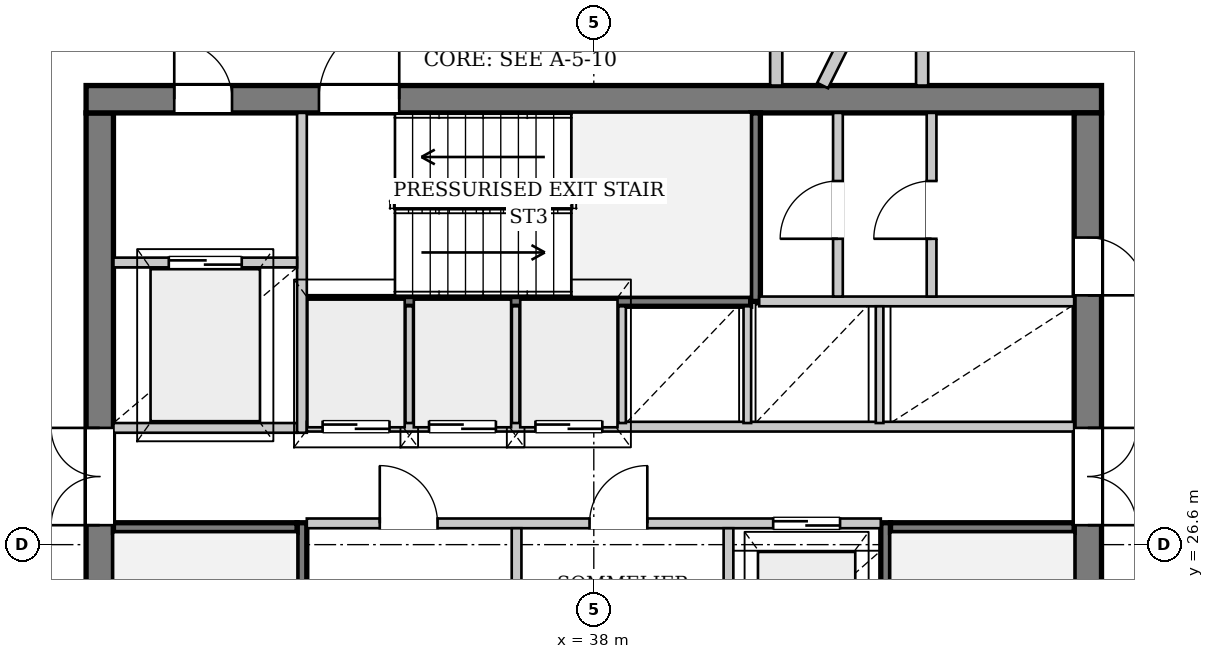
"""IFC4 building model, lengths in metres.
Left out: names, types, materials, properties, quantities, classifications, styles, units other than length and angle.
Written with IfcOpenShell. Run it as: python <this file> out.ifc"""

import sys

from ifc_helpers import new_model, si_unit, direction, frame, frame_2d, origin, place, context, subcontext, project, spatial, rectangle, extrude, source, transform, mapped, element, fill, save


model = new_model("IFC4")
c1 = context("Model", 3, precision=1e-05, world=origin(), true_north=direction((0.0, 1.0)))
c2 = subcontext(c1, "Body", "Model", "MODEL_VIEW")
j1 = project(units=[si_unit("LENGTHUNIT", "METRE"), si_unit("PLANEANGLEUNIT", "RADIAN")], contexts=[c1])
p1 = place(None, origin())
s1 = spatial("IfcSite", under=j1, at=p1, CompositionType="ELEMENT")
p2 = place(p1, origin())
s2 = spatial("IfcBuilding", under=s1, at=p2, CompositionType="ELEMENT")
p3 = place(p2, frame((0.0, 0.0, 238.1)))
s3 = spatial("IfcBuildingStorey", under=s2, at=p3, CompositionType="ELEMENT", Elevation=238.1)
p4 = place(p3, frame((15.525, 29.57, 0.0), z_axis=(0.0, 0.0, 1.0), x_axis=(0.855554684799, 0.517712450418, 0.0)))
e1 = element("IfcWall", 1, at=p4, inside=s3, PredefinedType="SOLIDWALL", context=c2, shape_type="SweptSolid", body=[
    extrude(rectangle(XDim=22.253, YDim=0.38, at=frame_2d((11.126, 0.0))), origin(), (0.0, 0.0, 1.0), 2.872),
])
p5 = place(p4, frame((5.131, 0.0, 0.502)))
e2 = element("IfcOpeningElement", 2, at=p5, cuts=e1, PredefinedType="OPENING", context=c2, shape_type="SweptSolid", body=[
    extrude(rectangle(XDim=2.2, YDim=2.25, at=frame_2d((1.1, 1.125))), frame((0.0, 0.2, 0.0), z_axis=(0.0, -1.0, 0.0), x_axis=(1.0, 0.0, 0.0)), (0.0, 0.0, 1.0), 0.4),
])
p6 = place(p4, frame((14.922, 0.0, 0.502)))
e3 = element("IfcOpeningElement", 3, at=p6, cuts=e1, PredefinedType="OPENING", context=c2, shape_type="SweptSolid", body=[
    extrude(rectangle(XDim=2.2, YDim=2.25, at=frame_2d((1.1, 1.125))), frame((0.0, 0.2, 0.0), z_axis=(0.0, -1.0, 0.0), x_axis=(1.0, 0.0, 0.0)), (0.0, 0.0, 1.0), 0.4),
])
p7 = place(p3, frame((29.875, 19.5, 0.0), z_axis=(0.0, 0.0, 1.0), x_axis=(0.0, 1.0, 0.0)))
e4 = element("IfcWall", 4, at=p7, inside=s3, PredefinedType="SHEAR", context=c2, shape_type="SweptSolid", body=[
    extrude(rectangle(XDim=14.2, YDim=0.45, at=frame_2d((7.1, 0.0))), origin(), (0.0, 0.0, 1.0), 3.38),
])
p8 = place(p7, frame((7.42, 0.0, 0.0)))
e5 = element("IfcOpeningElement", 5, at=p8, cuts=e4, PredefinedType="OPENING", context=c2, shape_type="SweptSolid", body=[
    extrude(rectangle(XDim=1.6, YDim=2.2, at=frame_2d((0.8, 1.1))), frame((0.0, 0.235, 0.0), z_axis=(0.0, -1.0, 0.0), x_axis=(1.0, 0.0, 0.0)), (0.0, 0.0, 1.0), 0.47),
])
p9 = place(p3, frame((29.65, 33.925, 0.0), z_axis=(0.0, 0.0, 1.0), x_axis=(1.0, 0.0, 0.0)))
e6 = element("IfcWall", 6, at=p9, inside=s3, PredefinedType="SHEAR", context=c2, shape_type="SweptSolid", body=[
    extrude(rectangle(XDim=16.7, YDim=0.45, at=frame_2d((8.35, 0.0))), origin(), (0.0, 0.0, 1.0), 3.38),
])
p10 = place(p9, frame((1.45, 0.0, 0.0)))
e7 = element("IfcOpeningElement", 7, at=p10, cuts=e6, PredefinedType="OPENING", context=c2, shape_type="SweptSolid", body=[
    extrude(rectangle(XDim=0.95, YDim=2.1, at=frame_2d((0.475, 1.05))), frame((0.0, 0.235, 0.0), z_axis=(0.0, -1.0, 0.0), x_axis=(1.0, 0.0, 0.0)), (0.0, 0.0, 1.0), 0.47),
])
p11 = place(p9, frame((3.83, 0.0, 0.0)))
e8 = element("IfcOpeningElement", 8, at=p11, cuts=e6, PredefinedType="OPENING", context=c2, shape_type="SweptSolid", body=[
    extrude(rectangle(XDim=1.32, YDim=2.2, at=frame_2d((0.66, 1.1))), frame((0.0, 0.235, 0.0), z_axis=(0.0, -1.0, 0.0), x_axis=(1.0, 0.0, 0.0)), (0.0, 0.0, 1.0), 0.47),
])
p12 = place(p3, frame((46.125, 33.7, 0.0), z_axis=(0.0, 0.0, 1.0), x_axis=(0.0, -1.0, 0.0)))
e9 = element("IfcWall", 9, at=p12, inside=s3, PredefinedType="SHEAR", context=c2, shape_type="SweptSolid", body=[
    extrude(rectangle(XDim=14.2, YDim=0.45, at=frame_2d((7.1, 0.0))), origin(), (0.0, 0.0, 1.0), 3.38),
])
p13 = place(p12, frame((5.18, 0.0, 0.0)))
e10 = element("IfcOpeningElement", 10, at=p13, cuts=e9, PredefinedType="OPENING", context=c2, shape_type="SweptSolid", body=[
    extrude(rectangle(XDim=1.6, YDim=2.2, at=frame_2d((0.8, 1.1))), frame((0.0, 0.235, 0.0), z_axis=(0.0, -1.0, 0.0), x_axis=(1.0, 0.0, 0.0)), (0.0, 0.0, 1.0), 0.47),
])
p14 = place(p12, frame((2.05, 0.0, 0.0)))
e11 = element("IfcOpeningElement", 11, at=p14, cuts=e9, PredefinedType="OPENING", context=c2, shape_type="SweptSolid", body=[
    extrude(rectangle(XDim=0.95, YDim=2.1, at=frame_2d((0.475, 1.05))), frame((0.0, 0.235, 0.0), z_axis=(0.0, -1.0, 0.0), x_axis=(1.0, 0.0, 0.0)), (0.0, 0.0, 1.0), 0.47),
])
p15 = place(p3, frame((33.2, 19.5, 0.0), z_axis=(0.0, 0.0, 1.0), x_axis=(0.0, 1.0, 0.0)))
e12 = element("IfcWall", 12, at=p15, inside=s3, PredefinedType="PARTITIONING", context=c2, shape_type="SweptSolid", body=[
    extrude(rectangle(XDim=7.46, YDim=0.16, at=frame_2d((3.73, 0.0))), origin(), (0.0, 0.0, 1.0), 3.38),
])
p16 = place(p15, frame((0.08, 0.0, 0.0)))
e13 = element("IfcOpeningElement", 13, at=p16, cuts=e12, PredefinedType="OPENING", context=c2, shape_type="SweptSolid", body=[
    extrude(rectangle(XDim=1.32, YDim=2.2, at=frame_2d((0.66, 1.1))), frame((0.0, 0.09, 0.0), z_axis=(0.0, -1.0, 0.0), x_axis=(1.0, 0.0, 0.0)), (0.0, 0.0, 1.0), 0.18),
])
p17 = place(p3, frame((30.1, 26.88, 0.0), z_axis=(0.0, 0.0, 1.0), x_axis=(1.0, 0.0, 0.0)))
e14 = element("IfcWall", 14, at=p17, inside=s3, PredefinedType="PARTITIONING", context=c2, shape_type="SweptSolid", body=[
    extrude(rectangle(XDim=3.02, YDim=0.16, at=frame_2d((1.51, 0.0))), origin(), (0.0, 0.0, 1.0), 3.38),
])
p18 = place(p3, frame((42.8, 26.96, 0.0), z_axis=(0.0, 0.0, 1.0), x_axis=(0.0, -1.0, 0.0)))
e15 = element("IfcWall", 15, at=p18, inside=s3, PredefinedType="PARTITIONING", context=c2, shape_type="SweptSolid", body=[
    extrude(rectangle(XDim=7.46, YDim=0.16, at=frame_2d((3.73, 0.0))), origin(), (0.0, 0.0, 1.0), 3.38),
])
p19 = place(p18, frame((6.06, 0.0, 0.0)))
e16 = element("IfcOpeningElement", 16, at=p19, cuts=e15, PredefinedType="OPENING", context=c2, shape_type="SweptSolid", body=[
    extrude(rectangle(XDim=1.32, YDim=2.2, at=frame_2d((0.66, 1.1))), frame((0.0, 0.09, 0.0), z_axis=(0.0, -1.0, 0.0), x_axis=(1.0, 0.0, 0.0)), (0.0, 0.0, 1.0), 0.18),
])
p20 = place(p3, frame((42.88, 26.88, 0.0), z_axis=(0.0, 0.0, 1.0), x_axis=(1.0, 0.0, 0.0)))
e17 = element("IfcWall", 17, at=p20, inside=s3, PredefinedType="PARTITIONING", context=c2, shape_type="SweptSolid", body=[
    extrude(rectangle(XDim=3.02, YDim=0.16, at=frame_2d((1.51, 0.0))), origin(), (0.0, 0.0, 1.0), 3.38),
])
p21 = place(p3, frame((33.28, 30.6, 0.0), z_axis=(0.0, 0.0, 1.0), x_axis=(1.0, 0.0, 0.0)))
e18 = element("IfcWall", 18, at=p21, inside=s3, PredefinedType="PARTITIONING", context=c2, shape_type="SweptSolid", body=[
    extrude(rectangle(XDim=7.3, YDim=0.16, at=frame_2d((3.65, 0.0))), origin(), (0.0, 0.0, 1.0), 3.38),
])
p22 = place(p3, frame((40.66, 30.6, 0.0), z_axis=(0.0, 0.0, 1.0), x_axis=(0.0, 1.0, 0.0)))
e19 = element("IfcWall", 19, at=p22, inside=s3, PredefinedType="PARTITIONING", context=c2, shape_type="SweptSolid", body=[
    extrude(rectangle(XDim=3.1, YDim=0.16, at=frame_2d((1.55, 0.0))), origin(), (0.0, 0.0, 1.0), 3.38),
])
p23 = place(p3, frame((30.1, 28.52, 0.0), z_axis=(0.0, 0.0, 1.0), x_axis=(1.0, 0.0, 0.0)))
e20 = element("IfcWall", 20, at=p23, inside=s3, PredefinedType="PARTITIONING", context=c2, shape_type="SweptSolid", body=[
    extrude(rectangle(XDim=3.02, YDim=0.16, at=frame_2d((1.51, 0.0))), origin(), (0.0, 0.0, 1.0), 3.38),
])
p24 = place(p3, frame((33.2, 28.44, 0.0), z_axis=(0.0, 0.0, 1.0), x_axis=(0.0, 1.0, 0.0)))
e21 = element("IfcWall", 21, at=p24, inside=s3, PredefinedType="PARTITIONING", context=c2, shape_type="SweptSolid", body=[
    extrude(rectangle(XDim=5.26, YDim=0.16, at=frame_2d((2.63, 0.0))), origin(), (0.0, 0.0, 1.0), 3.38),
])
p25 = place(p3, frame((30.1, 31.24, 0.0), z_axis=(0.0, 0.0, 1.0), x_axis=(1.0, 0.0, 0.0)))
e22 = element("IfcWall", 22, at=p25, inside=s3, PredefinedType="PARTITIONING", context=c2, shape_type="SweptSolid", body=[
    extrude(rectangle(XDim=3.02, YDim=0.16, at=frame_2d((1.51, 0.0))), origin(), (0.0, 0.0, 1.0), 3.38),
])
p26 = place(p25, frame((0.91, 0.0, 0.0)))
e23 = element("IfcOpeningElement", 23, at=p26, cuts=e22, PredefinedType="OPENING", context=c2, shape_type="SweptSolid", body=[
    extrude(rectangle(XDim=1.2, YDim=2.2, at=frame_2d((0.6, 1.1))), frame((0.0, 0.09, 0.0), z_axis=(0.0, -1.0, 0.0), x_axis=(1.0, 0.0, 0.0)), (0.0, 0.0, 1.0), 0.18),
])
p27 = place(p3, frame((33.28, 26.95, 0.0), z_axis=(0.0, 0.0, 1.0), x_axis=(1.0, 0.0, 0.0)))
e24 = element("IfcWall", 24, at=p27, inside=s3, PredefinedType="PARTITIONING", context=c2, shape_type="SweptSolid", body=[
    extrude(rectangle(XDim=9.44, YDim=0.16, at=frame_2d((4.72, 0.0))), origin(), (0.0, 0.0, 1.0), 3.38),
])
p28 = place(p27, frame((1.2, 0.0, 0.0)))
e25 = element("IfcOpeningElement", 25, at=p28, cuts=e24, PredefinedType="OPENING", context=c2, shape_type="SweptSolid", body=[
    extrude(rectangle(XDim=0.95, YDim=2.1, at=frame_2d((0.475, 1.05))), frame((0.0, 0.09, 0.0), z_axis=(0.0, -1.0, 0.0), x_axis=(1.0, 0.0, 0.0)), (0.0, 0.0, 1.0), 0.18),
])
p29 = place(p27, frame((4.65, 0.0, 0.0)))
e26 = element("IfcOpeningElement", 26, at=p29, cuts=e24, PredefinedType="OPENING", context=c2, shape_type="SweptSolid", body=[
    extrude(rectangle(XDim=0.95, YDim=2.1, at=frame_2d((0.475, 1.05))), frame((0.0, 0.09, 0.0), z_axis=(0.0, -1.0, 0.0), x_axis=(1.0, 0.0, 0.0)), (0.0, 0.0, 1.0), 0.18),
])
p30 = place(p27, frame((7.67, 0.0, 0.0)))
e27 = element("IfcOpeningElement", 27, at=p30, cuts=e24, PredefinedType="OPENING", context=c2, shape_type="SweptSolid", body=[
    extrude(rectangle(XDim=1.1, YDim=2.2, at=frame_2d((0.55, 1.1))), frame((0.0, 0.09, 0.0), z_axis=(0.0, -1.0, 0.0), x_axis=(1.0, 0.0, 0.0)), (0.0, 0.0, 1.0), 0.18),
])
for number, where, z_axis, x_axis in (
    (28, (36.73, 24.56, 0.0), (0.0, 0.0, 1.0), (0.0, 1.0, 0.0)),
    (29, (40.215, 24.56, 0.0), (0.0, 0.0, 1.0), (0.0, 1.0, 0.0)),
):
    element("IfcWall", number, at=place(p3, frame(where, z_axis=z_axis, x_axis=x_axis)), inside=s3, PredefinedType="PARTITIONING", context=c2, shape_type="SweptSolid", body=[
        extrude(rectangle(XDim=2.31, YDim=0.16, at=frame_2d((1.155, 0.0))), origin(), (0.0, 0.0, 1.0), 3.38),
    ])
p31 = place(p3, frame((33.28, 28.54, 0.0), z_axis=(0.0, 0.0, 1.0), x_axis=(1.0, 0.0, 0.0)))
e30 = element("IfcWall", 30, at=p31, inside=s3, PredefinedType="PARTITIONING", context=c2, shape_type="SweptSolid", body=[
    extrude(rectangle(XDim=12.62, YDim=0.16, at=frame_2d((6.31, 0.0))), origin(), (0.0, 0.0, 1.0), 3.38),
])
p32 = place(p31, frame((0.26, 0.0, 0.0)))
e31 = element("IfcOpeningElement", 31, at=p32, cuts=e30, PredefinedType="OPENING", context=c2, shape_type="SweptSolid", body=[
    extrude(rectangle(XDim=1.1, YDim=2.2, at=frame_2d((0.55, 1.1))), frame((0.0, 0.09, 0.0), z_axis=(0.0, -1.0, 0.0), x_axis=(1.0, 0.0, 0.0)), (0.0, 0.0, 1.0), 0.18),
])
p33 = place(p31, frame((2.01, 0.0, 0.0)))
e32 = element("IfcOpeningElement", 32, at=p33, cuts=e30, PredefinedType="OPENING", context=c2, shape_type="SweptSolid", body=[
    extrude(rectangle(XDim=1.1, YDim=2.2, at=frame_2d((0.55, 1.1))), frame((0.0, 0.09, 0.0), z_axis=(0.0, -1.0, 0.0), x_axis=(1.0, 0.0, 0.0)), (0.0, 0.0, 1.0), 0.18),
])
p34 = place(p31, frame((3.76, 0.0, 0.0)))
e33 = element("IfcOpeningElement", 33, at=p34, cuts=e30, PredefinedType="OPENING", context=c2, shape_type="SweptSolid", body=[
    extrude(rectangle(XDim=1.1, YDim=2.2, at=frame_2d((0.55, 1.1))), frame((0.0, 0.09, 0.0), z_axis=(0.0, -1.0, 0.0), x_axis=(1.0, 0.0, 0.0)), (0.0, 0.0, 1.0), 0.18),
])
p35 = place(p3, frame((40.72, 30.6, 0.0), z_axis=(0.0, 0.0, 1.0), x_axis=(1.0, 0.0, 0.0)))
e34 = element("IfcWall", 34, at=p35, inside=s3, PredefinedType="PARTITIONING", context=c2, shape_type="SweptSolid", body=[
    extrude(rectangle(XDim=5.18, YDim=0.16, at=frame_2d((2.59, 0.0))), origin(), (0.0, 0.0, 1.0), 3.38),
])
for number, where, z_axis, x_axis in (
    (35, (34.965, 28.6, 0.0), (0.0, 0.0, 1.0), (0.0, 1.0, 0.0)),
    (36, (36.715, 28.6, 0.0), (0.0, 0.0, 1.0), (0.0, 1.0, 0.0)),
    (37, (38.465, 28.6, 0.0), (0.0, 0.0, 1.0), (0.0, 1.0, 0.0)),
    (38, (40.525, 28.6, 0.0), (0.0, 0.0, 1.0), (0.0, 1.0, 0.0)),
    (39, (42.7, 28.6, 0.0), (0.0, 0.0, 1.0), (0.0, 1.0, 0.0)),
):
    element("IfcWall", number, at=place(p3, frame(where, z_axis=z_axis, x_axis=x_axis)), inside=s3, PredefinedType="PARTITIONING", context=c2, shape_type="SweptSolid", body=[
        extrude(rectangle(XDim=1.92, YDim=0.125, at=frame_2d((0.96, 0.0))), origin(), (0.0, 0.0, 1.0), 3.38),
    ])
p36 = place(p3, frame((42.015, 30.68, 0.0), z_axis=(0.0, 0.0, 1.0), x_axis=(0.0, 1.0, 0.0)))
e40 = element("IfcWall", 40, at=p36, inside=s3, PredefinedType="PARTITIONING", context=c2, shape_type="SweptSolid", body=[
    extrude(rectangle(XDim=3.02, YDim=0.16, at=frame_2d((1.51, 0.0))), origin(), (0.0, 0.0, 1.0), 3.38),
])
p37 = place(p36, frame((0.95, 0.0, 0.0)))
e41 = element("IfcOpeningElement", 41, at=p37, cuts=e40, PredefinedType="OPENING", context=c2, shape_type="SweptSolid", body=[
    extrude(rectangle(XDim=0.95, YDim=2.1, at=frame_2d((0.475, 1.05))), frame((0.0, 0.09, 0.0), z_axis=(0.0, -1.0, 0.0), x_axis=(1.0, 0.0, 0.0)), (0.0, 0.0, 1.0), 0.18),
])
p38 = place(p3, frame((43.555, 30.68, 0.0), z_axis=(0.0, 0.0, 1.0), x_axis=(0.0, 1.0, 0.0)))
e42 = element("IfcWall", 42, at=p38, inside=s3, PredefinedType="PARTITIONING", context=c2, shape_type="SweptSolid", body=[
    extrude(rectangle(XDim=3.02, YDim=0.16, at=frame_2d((1.51, 0.0))), origin(), (0.0, 0.0, 1.0), 3.38),
])
p39 = place(p38, frame((0.95, 0.0, 0.0)))
e43 = element("IfcOpeningElement", 43, at=p39, cuts=e42, PredefinedType="OPENING", context=c2, shape_type="SweptSolid", body=[
    extrude(rectangle(XDim=0.95, YDim=2.1, at=frame_2d((0.475, 1.05))), frame((0.0, 0.09, 0.0), z_axis=(0.0, -1.0, 0.0), x_axis=(1.0, 0.0, 0.0)), (0.0, 0.0, 1.0), 0.18),
])
p40 = place(p3, frame((41.763, 34.15, 0.0), z_axis=(0.0, 0.0, 1.0), x_axis=(0.446117078005, 0.894974610094, 0.0)))
e44 = element("IfcWall", 44, at=p40, inside=s3, PredefinedType="PARTITIONING", context=c2, shape_type="SweptSolid", body=[
    extrude(rectangle(XDim=13.541, YDim=0.2, at=frame_2d((6.771, 0.0))), origin(), (0.0, 0.0, 1.0), 3.38),
])
for number, where, z_axis, x_axis in (
    (45, (41.0, 34.15, 0.0), (0.0, 0.0, 1.0), (0.0, 1.0, 0.0)),
    (46, (43.4, 34.15, 0.0), (0.0, 0.0, 1.0), (0.0, 1.0, 0.0)),
):
    element("IfcWall", number, at=place(p3, frame(where, z_axis=z_axis, x_axis=x_axis)), inside=s3, PredefinedType="PARTITIONING", context=c2, shape_type="SweptSolid", body=[
        extrude(rectangle(XDim=1.85, YDim=0.2, at=frame_2d((0.925, 0.0))), origin(), (0.0, 0.0, 1.0), 3.38),
    ])
m1 = source(origin(), c2, "Body", "SweptSolid", [
    extrude(rectangle(XDim=1.6, YDim=2.2, at=frame_2d((0.8, 1.1))), frame((0.0, 0.025, 0.0), z_axis=(0.0, -1.0, 0.0), x_axis=(1.0, 0.0, 0.0)), (0.0, 0.0, 1.0), 0.05),
])
p41 = place(p8, origin())
e47 = element("IfcDoor", 47, at=p41, inside=s3, OperationType="DOUBLE_DOOR_SINGLE_SWING", PredefinedType="DOOR", context=c2, shape_type="MappedRepresentation", body=[
    mapped(m1, transform((0.0, 0.0, 0.0), x_axis=(1.0, 0.0, 0.0), y_axis=(0.0, 1.0, 0.0), z_axis=(0.0, 0.0, 1.0), scale=1.0)),
])
fill(e5, e47)
m2 = source(origin(), c2, "Body", "SweptSolid", [
    extrude(rectangle(XDim=0.95, YDim=2.1, at=frame_2d((0.475, 1.05))), frame((0.0, 0.025, 0.0), z_axis=(0.0, -1.0, 0.0), x_axis=(1.0, 0.0, 0.0)), (0.0, 0.0, 1.0), 0.05),
])
p42 = place(p10, origin())
e48 = element("IfcDoor", 48, at=p42, inside=s3, OperationType="SINGLE_SWING_LEFT", PredefinedType="DOOR", context=c2, shape_type="MappedRepresentation", body=[
    mapped(m2, transform((0.0, 0.0, 0.0), x_axis=(1.0, 0.0, 0.0), y_axis=(0.0, 1.0, 0.0), z_axis=(0.0, 0.0, 1.0), scale=1.0)),
])
fill(e7, e48)
m3 = source(origin(), c2, "Body", "SweptSolid", [
    extrude(rectangle(XDim=1.32, YDim=2.2, at=frame_2d((0.66, 1.1))), frame((0.0, 0.025, 0.0), z_axis=(0.0, -1.0, 0.0), x_axis=(1.0, 0.0, 0.0)), (0.0, 0.0, 1.0), 0.05),
])
p43 = place(p11, origin())
e49 = element("IfcDoor", 49, at=p43, inside=s3, OperationType="SINGLE_SWING_RIGHT", PredefinedType="DOOR", context=c2, shape_type="MappedRepresentation", body=[
    mapped(m3, transform((0.0, 0.0, 0.0), x_axis=(1.0, 0.0, 0.0), y_axis=(0.0, 1.0, 0.0), z_axis=(0.0, 0.0, 1.0), scale=1.0)),
])
fill(e8, e49)
p44 = place(p13, origin())
e50 = element("IfcDoor", 50, at=p44, inside=s3, OperationType="DOUBLE_DOOR_SINGLE_SWING", PredefinedType="DOOR", context=c2, shape_type="MappedRepresentation", body=[
    mapped(m1, transform((0.0, 0.0, 0.0), x_axis=(1.0, 0.0, 0.0), y_axis=(0.0, 1.0, 0.0), z_axis=(0.0, 0.0, 1.0), scale=1.0)),
])
fill(e10, e50)
m4 = source(origin(), c2, "Body", "SweptSolid", [
    extrude(rectangle(XDim=1.2, YDim=2.2, at=frame_2d((0.6, 1.1))), frame((0.0, 0.025, 0.0), z_axis=(0.0, -1.0, 0.0), x_axis=(1.0, 0.0, 0.0)), (0.0, 0.0, 1.0), 0.05),
])
p45 = place(p26, origin())
e51 = element("IfcDoor", 51, at=p45, inside=s3, OperationType="DOUBLE_DOOR_SLIDING", PredefinedType="DOOR", context=c2, shape_type="MappedRepresentation", body=[
    mapped(m4, transform((0.0, 0.0, 0.0), x_axis=(1.0, 0.0, 0.0), y_axis=(0.0, 1.0, 0.0), z_axis=(0.0, 0.0, 1.0), scale=1.0)),
])
fill(e23, e51)
p46 = place(p28, origin())
e52 = element("IfcDoor", 52, at=p46, inside=s3, OperationType="SINGLE_SWING_LEFT", PredefinedType="DOOR", context=c2, shape_type="MappedRepresentation", body=[
    mapped(m2, transform((0.0, 0.0, 0.0), x_axis=(1.0, 0.0, 0.0), y_axis=(0.0, 1.0, 0.0), z_axis=(0.0, 0.0, 1.0), scale=1.0)),
])
fill(e25, e52)
p47 = place(p29, origin())
e53 = element("IfcDoor", 53, at=p47, inside=s3, OperationType="SINGLE_SWING_RIGHT", PredefinedType="DOOR", context=c2, shape_type="MappedRepresentation", body=[
    mapped(m2, transform((0.0, 0.0, 0.0), x_axis=(1.0, 0.0, 0.0), y_axis=(0.0, 1.0, 0.0), z_axis=(0.0, 0.0, 1.0), scale=1.0)),
])
fill(e26, e53)
m5 = source(origin(), c2, "Body", "SweptSolid", [
    extrude(rectangle(XDim=1.1, YDim=2.2, at=frame_2d((0.55, 1.1))), frame((0.0, 0.025, 0.0), z_axis=(0.0, -1.0, 0.0), x_axis=(1.0, 0.0, 0.0)), (0.0, 0.0, 1.0), 0.05),
])
p48 = place(p30, origin())
e54 = element("IfcDoor", 54, at=p48, inside=s3, OperationType="DOUBLE_DOOR_SLIDING", PredefinedType="DOOR", context=c2, shape_type="MappedRepresentation", body=[
    mapped(m5, transform((0.0, 0.0, 0.0), x_axis=(1.0, 0.0, 0.0), y_axis=(0.0, 1.0, 0.0), z_axis=(0.0, 0.0, 1.0), scale=1.0)),
])
fill(e27, e54)
p49 = place(p32, origin())
e55 = element("IfcDoor", 55, at=p49, inside=s3, OperationType="DOUBLE_DOOR_SLIDING", PredefinedType="DOOR", context=c2, shape_type="MappedRepresentation", body=[
    mapped(m5, transform((0.0, 0.0, 0.0), x_axis=(1.0, 0.0, 0.0), y_axis=(0.0, 1.0, 0.0), z_axis=(0.0, 0.0, 1.0), scale=1.0)),
])
fill(e31, e55)
p50 = place(p33, origin())
e56 = element("IfcDoor", 56, at=p50, inside=s3, OperationType="DOUBLE_DOOR_SLIDING", PredefinedType="DOOR", context=c2, shape_type="MappedRepresentation", body=[
    mapped(m5, transform((0.0, 0.0, 0.0), x_axis=(1.0, 0.0, 0.0), y_axis=(0.0, 1.0, 0.0), z_axis=(0.0, 0.0, 1.0), scale=1.0)),
])
fill(e32, e56)
p51 = place(p34, origin())
e57 = element("IfcDoor", 57, at=p51, inside=s3, OperationType="DOUBLE_DOOR_SLIDING", PredefinedType="DOOR", context=c2, shape_type="MappedRepresentation", body=[
    mapped(m5, transform((0.0, 0.0, 0.0), x_axis=(1.0, 0.0, 0.0), y_axis=(0.0, 1.0, 0.0), z_axis=(0.0, 0.0, 1.0), scale=1.0)),
])
fill(e33, e57)
p52 = place(p37, origin())
e58 = element("IfcDoor", 58, at=p52, inside=s3, OperationType="SINGLE_SWING_LEFT", PredefinedType="DOOR", context=c2, shape_type="MappedRepresentation", body=[
    mapped(m2, transform((0.0, 0.0, 0.0), x_axis=(1.0, 0.0, 0.0), y_axis=(0.0, 1.0, 0.0), z_axis=(0.0, 0.0, 1.0), scale=1.0)),
])
fill(e41, e58)
p53 = place(p39, origin())
e59 = element("IfcDoor", 59, at=p53, inside=s3, OperationType="SINGLE_SWING_LEFT", PredefinedType="DOOR", context=c2, shape_type="MappedRepresentation", body=[
    mapped(m2, transform((0.0, 0.0, 0.0), x_axis=(1.0, 0.0, 0.0), y_axis=(0.0, 1.0, 0.0), z_axis=(0.0, 0.0, 1.0), scale=1.0)),
])
fill(e43, e59)
p54 = place(p14, origin())
e60 = element("IfcDoor", 60, at=p54, inside=s3, OperationType="SINGLE_SWING_RIGHT", PredefinedType="DOOR", context=c2, shape_type="MappedRepresentation", body=[
    mapped(m2, transform((0.0, 0.0, 0.0), x_axis=(1.0, 0.0, 0.0), y_axis=(0.0, 1.0, 0.0), z_axis=(0.0, 0.0, 1.0), scale=1.0)),
])
fill(e11, e60)
save(model, sys.argv[1])
